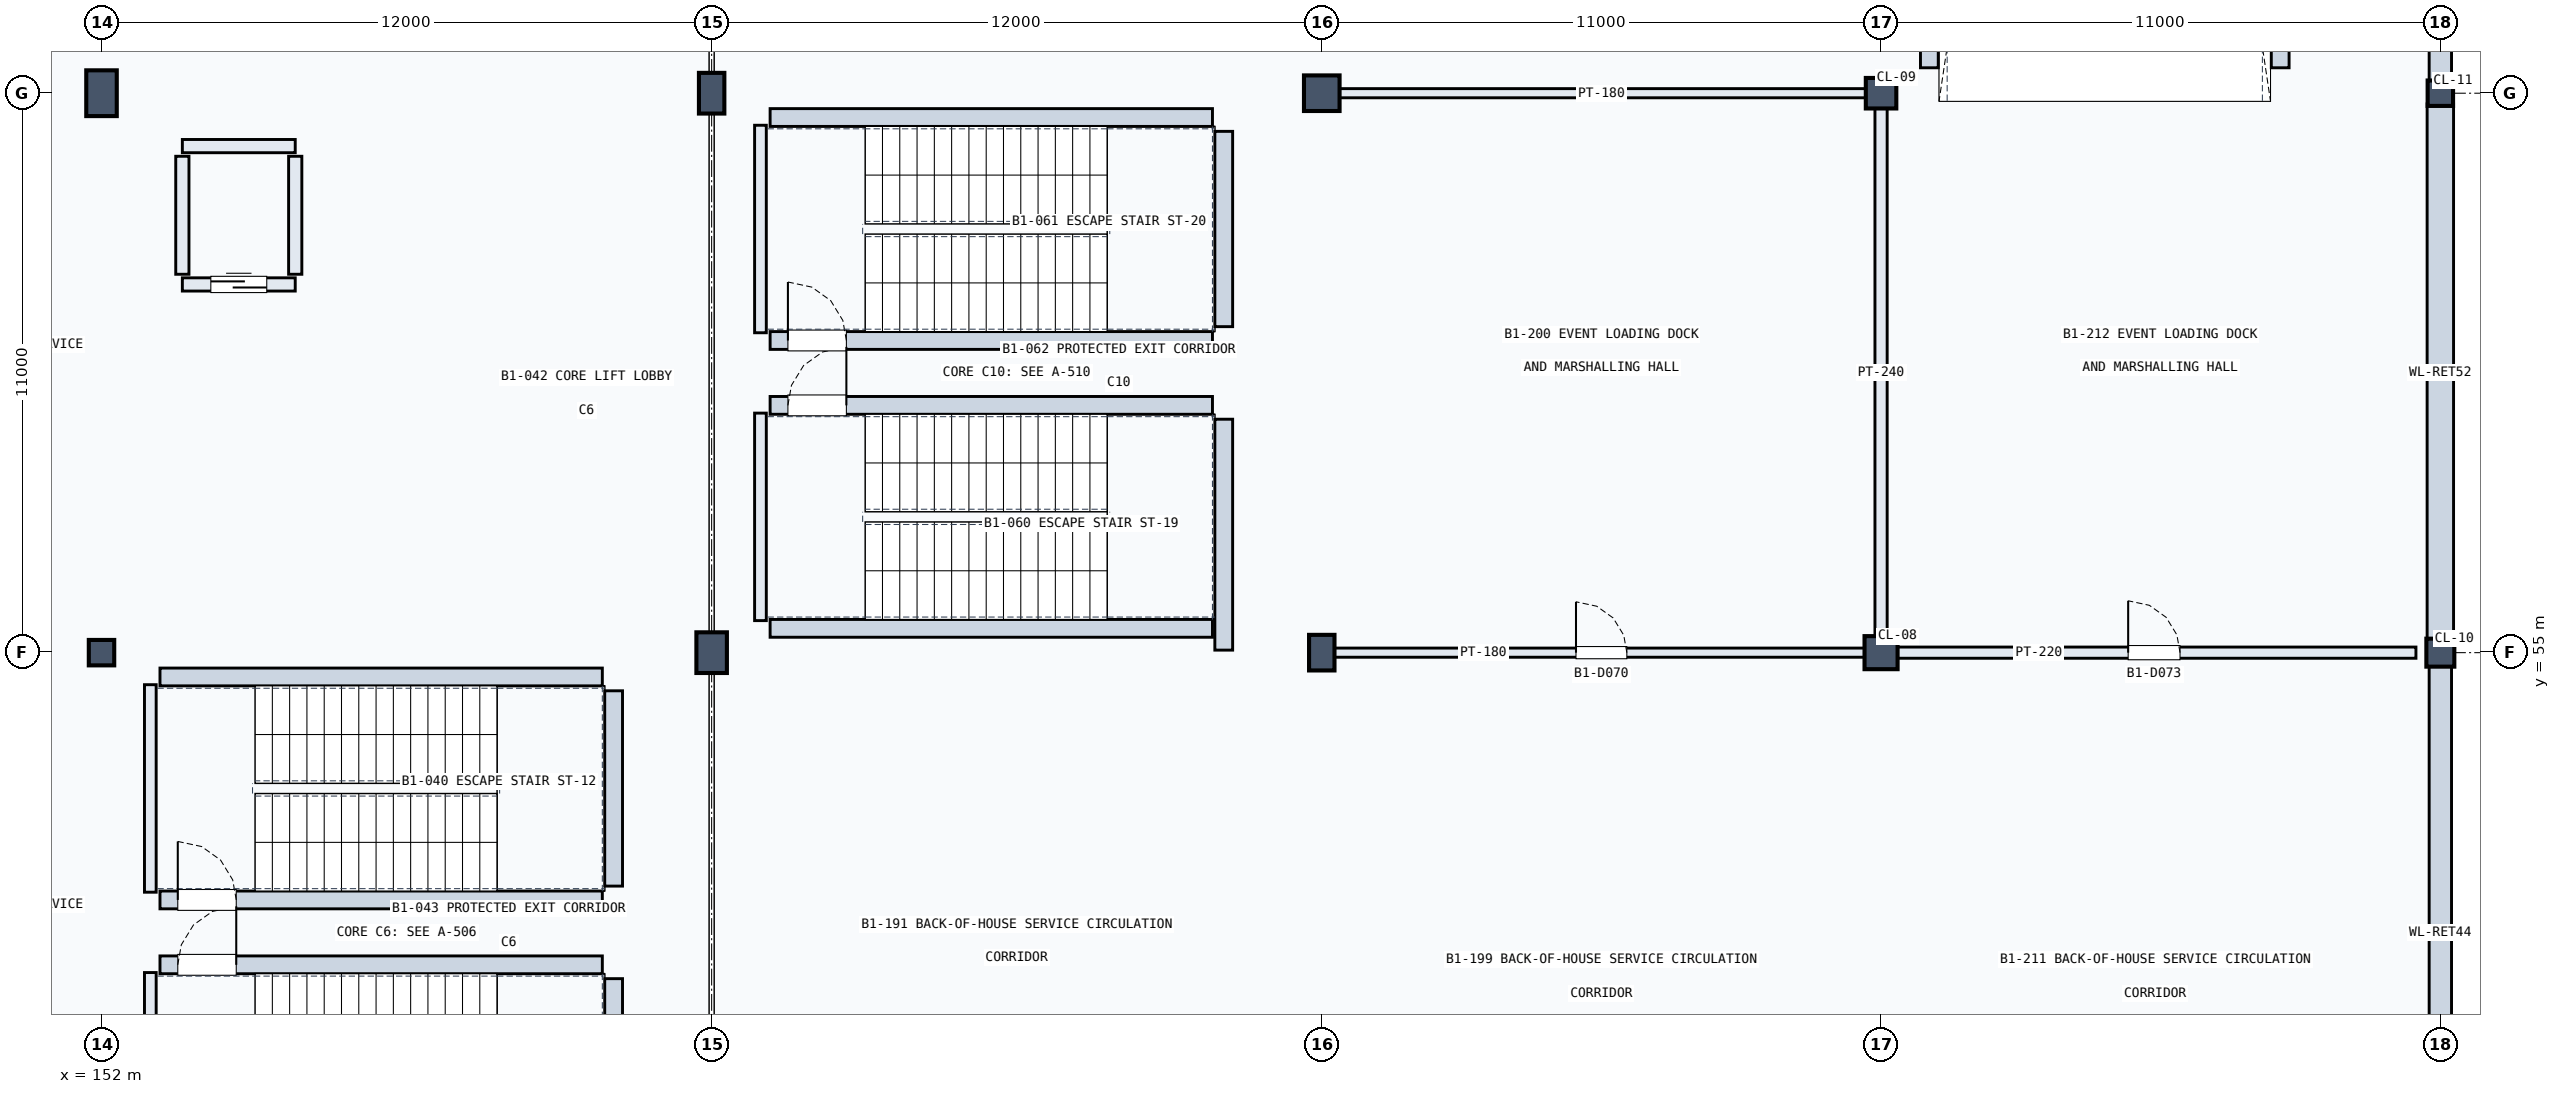
"""IFC4 building model, lengths in metres.
Left out: names, types, materials, properties, quantities, classifications, styles, units other than length and angle.
Written with IfcOpenShell. Run it as: python <this file> out.ifc"""

import sys

from ifc_helpers import new_model, si_unit, direction, frame, frame_2d, origin, origin_2d, place, context, subcontext, project, spatial, rectangle, extrude, element, fill, save


model = new_model("IFC4")
c1 = context("Model", 3, precision=1e-05, world=origin(), true_north=direction((0.0, 1.0)))
c2 = subcontext(c1, "Body", "Model", "MODEL_VIEW")
j1 = project(units=[si_unit("LENGTHUNIT", "METRE"), si_unit("PLANEANGLEUNIT", "RADIAN")], contexts=[c1])
p1 = place(None, origin())
s1 = spatial("IfcSite", under=j1, at=p1, CompositionType="ELEMENT")
p2 = place(p1, origin())
s2 = spatial("IfcBuilding", under=s1, at=p2, CompositionType="ELEMENT")
p3 = place(p2, frame((0.0, 0.0, -5.4)))
s3 = spatial("IfcBuildingStorey", under=s2, at=p3, CompositionType="ELEMENT", Elevation=-5.4)
p4 = place(p3, frame((152.0, 55.0, 0.0), z_axis=(0.0, 0.0, 1.0), x_axis=(1.0, 0.0, 0.0)))
e1 = element("IfcColumn", 1, at=p4, inside=s3, PredefinedType="COLUMN", context=c2, shape_type="SweptSolid", body=[
    extrude(rectangle(XDim=0.5, YDim=0.5, at=origin_2d()), origin(), (0.0, 0.0, 1.0), 5.4),
])
p5 = place(p3, frame((152.0, 66.0, 0.0), z_axis=(0.0, 0.0, 1.0), x_axis=(1.0, 0.0, 0.0)))
e2 = element("IfcColumn", 2, at=p5, inside=s3, PredefinedType="COLUMN", context=c2, shape_type="SweptSolid", body=[
    extrude(rectangle(XDim=0.6, YDim=0.9, at=origin_2d()), origin(), (0.0, 0.0, 1.0), 5.4),
])
p6 = place(p3, frame((164.0, 55.0, 0.0), z_axis=(0.0, 0.0, 1.0), x_axis=(1.0, 0.0, 0.0)))
e3 = element("IfcColumn", 3, at=p6, inside=s3, PredefinedType="COLUMN", context=c2, shape_type="SweptSolid", body=[
    extrude(rectangle(XDim=0.6, YDim=0.8, at=origin_2d()), origin(), (0.0, 0.0, 1.0), 5.4),
])
p7 = place(p3, frame((164.0, 66.0, 0.0), z_axis=(0.0, 0.0, 1.0), x_axis=(1.0, 0.0, 0.0)))
e4 = element("IfcColumn", 4, at=p7, inside=s3, PredefinedType="COLUMN", context=c2, shape_type="SweptSolid", body=[
    extrude(rectangle(XDim=0.5, YDim=0.8, at=origin_2d()), origin(), (0.0, 0.0, 1.0), 5.4),
])
p8 = place(p3, frame((176.0, 55.0, 0.0), z_axis=(0.0, 0.0, 1.0), x_axis=(1.0, 0.0, 0.0)))
e5 = element("IfcColumn", 5, at=p8, inside=s3, PredefinedType="COLUMN", context=c2, shape_type="SweptSolid", body=[
    extrude(rectangle(XDim=0.5, YDim=0.7, at=origin_2d()), origin(), (0.0, 0.0, 1.0), 5.4),
])
p9 = place(p3, frame((176.0, 66.0, 0.0), z_axis=(0.0, 0.0, 1.0), x_axis=(1.0, 0.0, 0.0)))
e6 = element("IfcColumn", 6, at=p9, inside=s3, PredefinedType="COLUMN", context=c2, shape_type="SweptSolid", body=[
    extrude(rectangle(XDim=0.7, YDim=0.7, at=origin_2d()), origin(), (0.0, 0.0, 1.0), 5.4),
])
p10 = place(p3, frame((187.0, 55.0, 0.0), z_axis=(0.0, 0.0, 1.0), x_axis=(1.0, 0.0, 0.0)))
e7 = element("IfcColumn", 7, at=p10, inside=s3, PredefinedType="COLUMN", context=c2, shape_type="SweptSolid", body=[
    extrude(rectangle(XDim=0.65, YDim=0.65, at=origin_2d()), origin(), (0.0, 0.0, 1.0), 5.4),
])
p11 = place(p3, frame((187.0, 66.0, 0.0), z_axis=(0.0, 0.0, 1.0), x_axis=(1.0, 0.0, 0.0)))
e8 = element("IfcColumn", 8, at=p11, inside=s3, PredefinedType="COLUMN", context=c2, shape_type="SweptSolid", body=[
    extrude(rectangle(XDim=0.6, YDim=0.6, at=origin_2d()), origin(), (0.0, 0.0, 1.0), 5.4),
])
p12 = place(p3, frame((198.0, 55.0, 0.0), z_axis=(0.0, 0.0, 1.0), x_axis=(1.0, 0.0, 0.0)))
e9 = element("IfcColumn", 9, at=p12, inside=s3, PredefinedType="COLUMN", context=c2, shape_type="SweptSolid", body=[
    extrude(rectangle(XDim=0.55, YDim=0.55, at=origin_2d()), origin(), (0.0, 0.0, 1.0), 5.4),
])
p13 = place(p3, frame((198.0, 66.0, 0.0), z_axis=(0.0, 0.0, 1.0), x_axis=(1.0, 0.0, 0.0)))
e10 = element("IfcColumn", 10, at=p13, inside=s3, PredefinedType="COLUMN", context=c2, shape_type="SweptSolid", body=[
    extrude(rectangle(XDim=0.5, YDim=0.5, at=origin_2d()), origin(), (0.0, 0.0, 1.0), 5.4),
])
p14 = place(p3, frame((198.0, 44.22, 0.0), z_axis=(0.0, 0.0, 1.0), x_axis=(0.0, 1.0, 0.0)))
e11 = element("IfcWall", 11, at=p14, inside=s3, PredefinedType="SOLIDWALL", context=c2, shape_type="SweptSolid", body=[
    extrude(rectangle(XDim=10.56, YDim=0.44, at=frame_2d((5.28, 0.0))), origin(), (0.0, 0.0, 1.0), 4.13),
])
p15 = place(p3, frame((198.0, 55.22, 0.0), z_axis=(0.0, 0.0, 1.0), x_axis=(0.0, 1.0, 0.0)))
e12 = element("IfcWall", 12, at=p15, inside=s3, PredefinedType="SOLIDWALL", context=c2, shape_type="SweptSolid", body=[
    extrude(rectangle(XDim=10.57, YDim=0.52, at=frame_2d((5.285, 0.0))), origin(), (0.0, 0.0, 1.0), 4.23),
])
p16 = place(p3, frame((198.0, 66.21, 0.0), z_axis=(0.0, 0.0, 1.0), x_axis=(0.0, 1.0, 0.0)))
e13 = element("IfcWall", 13, at=p16, inside=s3, PredefinedType="SOLIDWALL", context=c2, shape_type="SweptSolid", body=[
    extrude(rectangle(XDim=10.57, YDim=0.44, at=frame_2d((5.285, 0.0))), origin(), (0.0, 0.0, 1.0), 4.33),
])
p17 = place(p3, frame((152.96, 44.63, 0.0), z_axis=(0.0, 0.0, 1.0), x_axis=(0.0, 1.0, 0.0)))
e14 = element("IfcWall", 14, at=p17, inside=s3, PredefinedType="SOLIDWALL", context=c2, shape_type="SweptSolid", body=[
    extrude(rectangle(XDim=4.08, YDim=0.23, at=frame_2d((2.04, 0.0))), origin(), (0.0, 0.0, 1.0), 5.04),
])
p18 = place(p3, frame((162.072, 44.05, 0.0), z_axis=(0.0, 0.0, 1.0), x_axis=(0.0, 1.0, 0.0)))
e15 = element("IfcWall", 15, at=p18, inside=s3, PredefinedType="SOLIDWALL", context=c2, shape_type="SweptSolid", body=[
    extrude(rectangle(XDim=4.54, YDim=0.35, at=frame_2d((2.27, 0.0))), origin(), (0.0, 0.0, 1.0), 5.04),
])
p19 = place(p3, frame((153.15, 48.862, 0.0), z_axis=(0.0, 0.0, 1.0), x_axis=(1.0, 0.0, 0.0)))
e16 = element("IfcWall", 16, at=p19, inside=s3, PredefinedType="SOLIDWALL", context=c2, shape_type="SweptSolid", body=[
    extrude(rectangle(XDim=8.7, YDim=0.35, at=frame_2d((4.35, 0.0))), origin(), (0.0, 0.0, 1.0), 5.04),
])
p20 = place(p19, frame((0.35, 0.0, 0.0)))
e17 = element("IfcOpeningElement", 17, at=p20, cuts=e16, PredefinedType="OPENING", context=c2, shape_type="SweptSolid", body=[
    extrude(rectangle(XDim=1.15, YDim=2.2, at=frame_2d((0.575, 1.1))), frame((0.0, 0.185, 0.0), z_axis=(0.0, -1.0, 0.0), x_axis=(1.0, 0.0, 0.0)), (0.0, 0.0, 1.0), 0.37),
])
p21 = place(p3, frame((152.96, 50.29, 0.0), z_axis=(0.0, 0.0, 1.0), x_axis=(0.0, 1.0, 0.0)))
e18 = element("IfcWall", 18, at=p21, inside=s3, PredefinedType="SOLIDWALL", context=c2, shape_type="SweptSolid", body=[
    extrude(rectangle(XDim=4.08, YDim=0.23, at=frame_2d((2.04, 0.0))), origin(), (0.0, 0.0, 1.0), 5.04),
])
p22 = place(p3, frame((162.072, 50.41, 0.0), z_axis=(0.0, 0.0, 1.0), x_axis=(0.0, 1.0, 0.0)))
e19 = element("IfcWall", 19, at=p22, inside=s3, PredefinedType="SOLIDWALL", context=c2, shape_type="SweptSolid", body=[
    extrude(rectangle(XDim=3.84, YDim=0.35, at=frame_2d((1.92, 0.0))), origin(), (0.0, 0.0, 1.0), 5.04),
])
p23 = place(p3, frame((153.15, 50.138, 0.0), z_axis=(0.0, 0.0, 1.0), x_axis=(1.0, 0.0, 0.0)))
e20 = element("IfcWall", 20, at=p23, inside=s3, PredefinedType="SOLIDWALL", context=c2, shape_type="SweptSolid", body=[
    extrude(rectangle(XDim=8.7, YDim=0.35, at=frame_2d((4.35, 0.0))), origin(), (0.0, 0.0, 1.0), 5.04),
])
p24 = place(p23, frame((0.35, 0.0, 0.0)))
e21 = element("IfcOpeningElement", 21, at=p24, cuts=e20, PredefinedType="OPENING", context=c2, shape_type="SweptSolid", body=[
    extrude(rectangle(XDim=1.15, YDim=2.2, at=frame_2d((0.575, 1.1))), frame((0.0, 0.185, 0.0), z_axis=(0.0, -1.0, 0.0), x_axis=(1.0, 0.0, 0.0)), (0.0, 0.0, 1.0), 0.37),
])
p25 = place(p3, frame((153.15, 54.522, 0.0), z_axis=(0.0, 0.0, 1.0), x_axis=(1.0, 0.0, 0.0)))
e22 = element("IfcWall", 22, at=p25, inside=s3, PredefinedType="SOLIDWALL", context=c2, shape_type="SweptSolid", body=[
    extrude(rectangle(XDim=8.7, YDim=0.35, at=frame_2d((4.35, 0.0))), origin(), (0.0, 0.0, 1.0), 5.04),
])
p26 = place(p3, frame((153.59, 62.24, 0.0), z_axis=(0.0, 0.0, 1.0), x_axis=(1.0, 0.0, 0.0)))
e23 = element("IfcWall", 23, at=p26, inside=s3, PredefinedType="SOLIDWALL", context=c2, shape_type="SweptSolid", body=[
    extrude(rectangle(XDim=2.22, YDim=0.26, at=frame_2d((1.11, 0.0))), origin(), (0.0, 0.0, 1.0), 5.04),
])
p27 = place(p26, frame((0.56, 0.0, 0.0)))
e24 = element("IfcOpeningElement", 24, at=p27, cuts=e23, PredefinedType="OPENING", context=c2, shape_type="SweptSolid", body=[
    extrude(rectangle(XDim=1.1, YDim=2.15, at=frame_2d((0.55, 1.075))), frame((0.0, 0.14, 0.0), z_axis=(0.0, -1.0, 0.0), x_axis=(1.0, 0.0, 0.0)), (0.0, 0.0, 1.0), 0.28),
])
p28 = place(p3, frame((153.59, 64.96, 0.0), z_axis=(0.0, 0.0, 1.0), x_axis=(1.0, 0.0, 0.0)))
e25 = element("IfcWall", 25, at=p28, inside=s3, PredefinedType="SOLIDWALL", context=c2, shape_type="SweptSolid", body=[
    extrude(rectangle(XDim=2.22, YDim=0.26, at=frame_2d((1.11, 0.0))), origin(), (0.0, 0.0, 1.0), 5.04),
])
for number, where, z_axis, x_axis in (
    (26, (153.59, 62.44, 0.0), (0.0, 0.0, 1.0), (0.0, 1.0, 0.0)),
    (27, (155.81, 62.44, 0.0), (0.0, 0.0, 1.0), (0.0, 1.0, 0.0)),
):
    element("IfcWall", number, at=place(p3, frame(where, z_axis=z_axis, x_axis=x_axis)), inside=s3, PredefinedType="SOLIDWALL", context=c2, shape_type="SweptSolid", body=[
        extrude(rectangle(XDim=2.32, YDim=0.26, at=frame_2d((1.16, 0.0))), origin(), (0.0, 0.0, 1.0), 5.04),
    ])
p29 = place(p3, frame((164.96, 55.63, 0.0), z_axis=(0.0, 0.0, 1.0), x_axis=(0.0, 1.0, 0.0)))
e28 = element("IfcWall", 28, at=p29, inside=s3, PredefinedType="SOLIDWALL", context=c2, shape_type="SweptSolid", body=[
    extrude(rectangle(XDim=4.08, YDim=0.23, at=frame_2d((2.04, 0.0))), origin(), (0.0, 0.0, 1.0), 4.43),
])
p30 = place(p3, frame((174.072, 55.05, 0.0), z_axis=(0.0, 0.0, 1.0), x_axis=(0.0, 1.0, 0.0)))
e29 = element("IfcWall", 29, at=p30, inside=s3, PredefinedType="SOLIDWALL", context=c2, shape_type="SweptSolid", body=[
    extrude(rectangle(XDim=4.54, YDim=0.35, at=frame_2d((2.27, 0.0))), origin(), (0.0, 0.0, 1.0), 5.04),
])
p31 = place(p3, frame((165.15, 55.478, 0.0), z_axis=(0.0, 0.0, 1.0), x_axis=(1.0, 0.0, 0.0)))
e30 = element("IfcWall", 30, at=p31, inside=s3, PredefinedType="SOLIDWALL", context=c2, shape_type="SweptSolid", body=[
    extrude(rectangle(XDim=8.7, YDim=0.35, at=frame_2d((4.35, 0.0))), origin(), (0.0, 0.0, 1.0), 5.04),
])
p32 = place(p3, frame((165.15, 59.862, 0.0), z_axis=(0.0, 0.0, 1.0), x_axis=(1.0, 0.0, 0.0)))
e31 = element("IfcWall", 31, at=p32, inside=s3, PredefinedType="SOLIDWALL", context=c2, shape_type="SweptSolid", body=[
    extrude(rectangle(XDim=8.7, YDim=0.35, at=frame_2d((4.35, 0.0))), origin(), (0.0, 0.0, 1.0), 5.04),
])
p33 = place(p32, frame((0.35, 0.0, 0.0)))
e32 = element("IfcOpeningElement", 32, at=p33, cuts=e31, PredefinedType="OPENING", context=c2, shape_type="SweptSolid", body=[
    extrude(rectangle(XDim=1.15, YDim=2.2, at=frame_2d((0.575, 1.1))), frame((0.0, 0.185, 0.0), z_axis=(0.0, -1.0, 0.0), x_axis=(1.0, 0.0, 0.0)), (0.0, 0.0, 1.0), 0.37),
])
p34 = place(p3, frame((164.96, 61.29, 0.0), z_axis=(0.0, 0.0, 1.0), x_axis=(0.0, 1.0, 0.0)))
e33 = element("IfcWall", 33, at=p34, inside=s3, PredefinedType="SOLIDWALL", context=c2, shape_type="SweptSolid", body=[
    extrude(rectangle(XDim=4.08, YDim=0.23, at=frame_2d((2.04, 0.0))), origin(), (0.0, 0.0, 1.0), 4.43),
])
p35 = place(p3, frame((174.072, 61.41, 0.0), z_axis=(0.0, 0.0, 1.0), x_axis=(0.0, 1.0, 0.0)))
e34 = element("IfcWall", 34, at=p35, inside=s3, PredefinedType="SOLIDWALL", context=c2, shape_type="SweptSolid", body=[
    extrude(rectangle(XDim=3.84, YDim=0.35, at=frame_2d((1.92, 0.0))), origin(), (0.0, 0.0, 1.0), 5.04),
])
p36 = place(p3, frame((165.15, 61.138, 0.0), z_axis=(0.0, 0.0, 1.0), x_axis=(1.0, 0.0, 0.0)))
e35 = element("IfcWall", 35, at=p36, inside=s3, PredefinedType="SOLIDWALL", context=c2, shape_type="SweptSolid", body=[
    extrude(rectangle(XDim=8.7, YDim=0.35, at=frame_2d((4.35, 0.0))), origin(), (0.0, 0.0, 1.0), 5.04),
])
p37 = place(p36, frame((0.35, 0.0, 0.0)))
e36 = element("IfcOpeningElement", 36, at=p37, cuts=e35, PredefinedType="OPENING", context=c2, shape_type="SweptSolid", body=[
    extrude(rectangle(XDim=1.15, YDim=2.2, at=frame_2d((0.575, 1.1))), frame((0.0, 0.185, 0.0), z_axis=(0.0, -1.0, 0.0), x_axis=(1.0, 0.0, 0.0)), (0.0, 0.0, 1.0), 0.37),
])
p38 = place(p3, frame((165.15, 65.522, 0.0), z_axis=(0.0, 0.0, 1.0), x_axis=(1.0, 0.0, 0.0)))
e37 = element("IfcWall", 37, at=p38, inside=s3, PredefinedType="SOLIDWALL", context=c2, shape_type="SweptSolid", body=[
    extrude(rectangle(XDim=8.7, YDim=0.35, at=frame_2d((4.35, 0.0))), origin(), (0.0, 0.0, 1.0), 5.04),
])
for number, where, z_axis, x_axis in (
    (38, (187.95, 66.5, 0.0), (0.0, 0.0, 1.0), (0.0, 1.0, 0.0)),
    (39, (194.85, 66.5, 0.0), (0.0, 0.0, 1.0), (0.0, 1.0, 0.0)),
):
    element("IfcWall", number, at=place(p3, frame(where, z_axis=z_axis, x_axis=x_axis)), inside=s3, PredefinedType="SOLIDWALL", context=c2, shape_type="SweptSolid", body=[
        extrude(rectangle(XDim=42.7, YDim=0.35, at=frame_2d((21.35, 0.0))), origin(), (0.0, 0.0, 1.0), 3.88),
    ])
p39 = place(p3, frame((176.22, 55.0, 0.0), z_axis=(0.0, 0.0, 1.0), x_axis=(1.0, 0.0, 0.0)))
e40 = element("IfcWall", 40, at=p39, inside=s3, PredefinedType="PARTITIONING", context=c2, shape_type="SweptSolid", body=[
    extrude(rectangle(XDim=10.56, YDim=0.18, at=frame_2d((5.28, 0.0))), origin(), (0.0, 0.0, 1.0), 4.08),
])
p40 = place(p39, frame((4.78, 0.0, 0.0)))
e41 = element("IfcOpeningElement", 41, at=p40, cuts=e40, PredefinedType="OPENING", context=c2, shape_type="SweptSolid", body=[
    extrude(rectangle(XDim=1.0, YDim=2.15, at=frame_2d((0.5, 1.075))), frame((0.0, 0.1, 0.0), z_axis=(0.0, -1.0, 0.0), x_axis=(1.0, 0.0, 0.0)), (0.0, 0.0, 1.0), 0.2),
])
p41 = place(p3, frame((176.22, 66.0, 0.0), z_axis=(0.0, 0.0, 1.0), x_axis=(1.0, 0.0, 0.0)))
e42 = element("IfcWall", 42, at=p41, inside=s3, PredefinedType="PARTITIONING", context=c2, shape_type="SweptSolid", body=[
    extrude(rectangle(XDim=10.56, YDim=0.18, at=frame_2d((5.28, 0.0))), origin(), (0.0, 0.0, 1.0), 4.23),
])
p42 = place(p3, frame((187.22, 55.0, 0.0), z_axis=(0.0, 0.0, 1.0), x_axis=(1.0, 0.0, 0.0)))
e43 = element("IfcWall", 43, at=p42, inside=s3, PredefinedType="PARTITIONING", context=c2, shape_type="SweptSolid", body=[
    extrude(rectangle(XDim=10.3, YDim=0.22, at=frame_2d((5.15, 0.0))), origin(), (0.0, 0.0, 1.0), 4.08),
])
p43 = place(p42, frame((4.64, 0.0, 0.0)))
e44 = element("IfcOpeningElement", 44, at=p43, cuts=e43, PredefinedType="OPENING", context=c2, shape_type="SweptSolid", body=[
    extrude(rectangle(XDim=1.02, YDim=2.25, at=frame_2d((0.51, 1.125))), frame((0.0, 0.12, 0.0), z_axis=(0.0, -1.0, 0.0), x_axis=(1.0, 0.0, 0.0)), (0.0, 0.0, 1.0), 0.24),
])
p44 = place(p3, frame((187.0, 55.22, 0.0), z_axis=(0.0, 0.0, 1.0), x_axis=(0.0, 1.0, 0.0)))
e45 = element("IfcWall", 45, at=p44, inside=s3, PredefinedType="PARTITIONING", context=c2, shape_type="SweptSolid", body=[
    extrude(rectangle(XDim=10.56, YDim=0.24, at=frame_2d((5.28, 0.0))), origin(), (0.0, 0.0, 1.0), 4.08),
])
p45 = place(p20, origin())
e46 = element("IfcDoor", 46, at=p45, inside=s3, OperationType="SINGLE_SWING_RIGHT", PredefinedType="DOOR", context=c2, shape_type="SweptSolid", body=[
    extrude(rectangle(XDim=1.15, YDim=2.2, at=frame_2d((0.575, 1.1))), frame((0.0, 0.025, 0.0), z_axis=(0.0, -1.0, 0.0), x_axis=(1.0, 0.0, 0.0)), (0.0, 0.0, 1.0), 0.05),
])
fill(e17, e46)
p46 = place(p24, origin())
e47 = element("IfcDoor", 47, at=p46, inside=s3, OperationType="SINGLE_SWING_LEFT", PredefinedType="DOOR", context=c2, shape_type="SweptSolid", body=[
    extrude(rectangle(XDim=1.15, YDim=2.2, at=frame_2d((0.575, 1.1))), frame((0.0, 0.025, 0.0), z_axis=(0.0, -1.0, 0.0), x_axis=(1.0, 0.0, 0.0)), (0.0, 0.0, 1.0), 0.05),
])
fill(e21, e47)
p47 = place(p27, origin())
e48 = element("IfcDoor", 48, at=p47, inside=s3, OperationType="SLIDING_TO_LEFT", PredefinedType="DOOR", context=c2, shape_type="SweptSolid", body=[
    extrude(rectangle(XDim=1.1, YDim=2.15, at=frame_2d((0.55, 1.075))), frame((0.0, 0.025, 0.0), z_axis=(0.0, -1.0, 0.0), x_axis=(1.0, 0.0, 0.0)), (0.0, 0.0, 1.0), 0.05),
])
fill(e24, e48)
p48 = place(p33, origin())
e49 = element("IfcDoor", 49, at=p48, inside=s3, OperationType="SINGLE_SWING_RIGHT", PredefinedType="DOOR", context=c2, shape_type="SweptSolid", body=[
    extrude(rectangle(XDim=1.15, YDim=2.2, at=frame_2d((0.575, 1.1))), frame((0.0, 0.025, 0.0), z_axis=(0.0, -1.0, 0.0), x_axis=(1.0, 0.0, 0.0)), (0.0, 0.0, 1.0), 0.05),
])
fill(e32, e49)
p49 = place(p37, origin())
e50 = element("IfcDoor", 50, at=p49, inside=s3, OperationType="SINGLE_SWING_LEFT", PredefinedType="DOOR", context=c2, shape_type="SweptSolid", body=[
    extrude(rectangle(XDim=1.15, YDim=2.2, at=frame_2d((0.575, 1.1))), frame((0.0, 0.025, 0.0), z_axis=(0.0, -1.0, 0.0), x_axis=(1.0, 0.0, 0.0)), (0.0, 0.0, 1.0), 0.05),
])
fill(e36, e50)
p50 = place(p40, origin())
e51 = element("IfcDoor", 51, at=p50, inside=s3, OperationType="SINGLE_SWING_LEFT", PredefinedType="DOOR", context=c2, shape_type="SweptSolid", body=[
    extrude(rectangle(XDim=1.0, YDim=2.15, at=frame_2d((0.5, 1.075))), frame((0.0, 0.025, 0.0), z_axis=(0.0, -1.0, 0.0), x_axis=(1.0, 0.0, 0.0)), (0.0, 0.0, 1.0), 0.05),
])
fill(e41, e51)
p51 = place(p43, origin())
e52 = element("IfcDoor", 52, at=p51, inside=s3, OperationType="SINGLE_SWING_LEFT", PredefinedType="DOOR", context=c2, shape_type="SweptSolid", body=[
    extrude(rectangle(XDim=1.02, YDim=2.25, at=frame_2d((0.51, 1.125))), frame((0.0, 0.025, 0.0), z_axis=(0.0, -1.0, 0.0), x_axis=(1.0, 0.0, 0.0)), (0.0, 0.0, 1.0), 0.05),
])
fill(e44, e52)
save(model, sys.argv[1])
